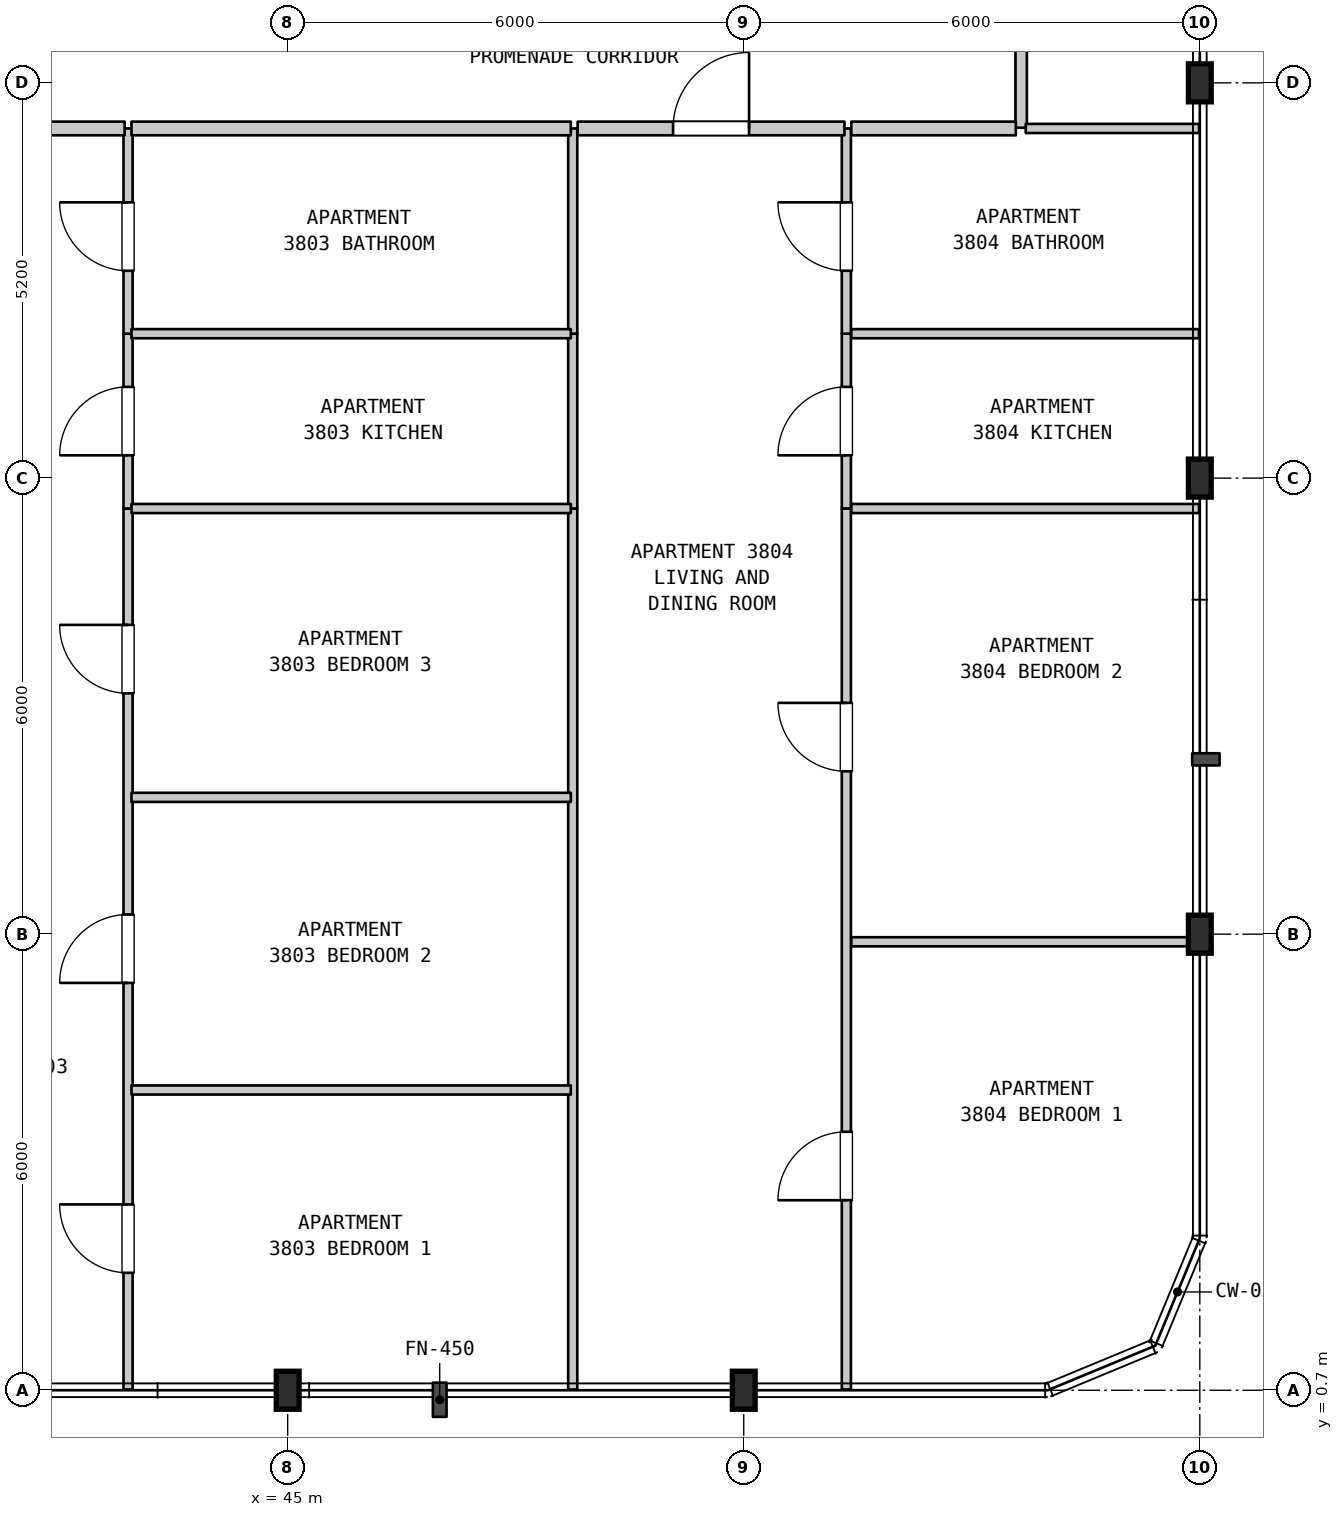
"""IFC4 building model, lengths in metres.
Left out: names, types, materials, properties, quantities, classifications, styles, units other than length and angle.
Written with IfcOpenShell. Run it as: python <this file> out.ifc"""

import sys

from ifc_helpers import new_model, si_unit, direction, frame, frame_2d, origin, origin_2d, place, context, subcontext, project, spatial, rectangle, i_section, extrude, element, fill, save


model = new_model("IFC4")
c1 = context("Model", 3, precision=1e-05, world=origin(), true_north=direction((0.0, 1.0)))
c2 = subcontext(c1, "Body", "Model", "MODEL_VIEW")
j1 = project(units=[si_unit("LENGTHUNIT", "METRE"), si_unit("PLANEANGLEUNIT", "RADIAN")], contexts=[c1])
p1 = place(None, origin())
s1 = spatial("IfcSite", under=j1, at=p1, CompositionType="ELEMENT")
p2 = place(p1, origin())
s2 = spatial("IfcBuilding", under=s1, at=p2, CompositionType="ELEMENT")
p3 = place(p2, frame((0.0, 0.0, 155.7)))
s3 = spatial("IfcBuildingStorey", under=s2, at=p3, CompositionType="ELEMENT", Elevation=155.7)
for number, where, z_axis, x_axis in (
    (1, (45.0, 0.7, 0.0), (0.0, 0.0, 1.0), (1.0, 0.0, 0.0)),
    (2, (51.0, 0.7, 0.0), (0.0, 0.0, 1.0), (1.0, 0.0, 0.0)),
    (3, (57.0, 6.7, 0.0), (0.0, 0.0, 1.0), (1.0, 0.0, 0.0)),
    (4, (57.0, 12.7, 0.0), (0.0, 0.0, 1.0), (1.0, 0.0, 0.0)),
    (5, (57.0, 17.9, 0.0), (0.0, 0.0, 1.0), (1.0, 0.0, 0.0)),
):
    element("IfcColumn", number, at=place(p3, frame(where, z_axis=z_axis, x_axis=x_axis)), inside=s3, PredefinedType="COLUMN", context=c2, shape_type="SweptSolid", body=[
        extrude(i_section(OverallWidth=0.3, OverallDepth=0.5, WebThickness=0.014, FlangeThickness=0.028, FilletRadius=0.027, at=origin_2d()), origin(), (0.0, 0.0, 1.0), 3.7),
    ])
p4 = place(p3, frame((42.9, 0.71, 0.0), z_axis=(0.0, 0.0, 1.0), x_axis=(0.0, 1.0, 0.0)))
e6 = element("IfcWall", 6, at=p4, inside=s3, PredefinedType="PARTITIONING", context=c2, shape_type="SweptSolid", body=[
    extrude(rectangle(XDim=11.59, YDim=0.12, at=frame_2d((5.795, 0.0))), origin(), (0.0, 0.0, 1.0), 3.28),
])
p5 = place(p4, frame((1.535, 0.0, 0.0)))
e7 = element("IfcOpeningElement", 7, at=p5, cuts=e6, PredefinedType="OPENING", context=c2, shape_type="SweptSolid", body=[
    extrude(rectangle(XDim=0.9, YDim=2.15, at=frame_2d((0.45, 1.075))), frame((0.0, 0.07, 0.0), z_axis=(0.0, -1.0, 0.0), x_axis=(1.0, 0.0, 0.0)), (0.0, 0.0, 1.0), 0.14),
])
p6 = place(p4, frame((5.349, 0.0, 0.0)))
e8 = element("IfcOpeningElement", 8, at=p6, cuts=e6, PredefinedType="OPENING", context=c2, shape_type="SweptSolid", body=[
    extrude(rectangle(XDim=0.9, YDim=2.15, at=frame_2d((0.45, 1.075))), frame((0.0, 0.07, 0.0), z_axis=(0.0, -1.0, 0.0), x_axis=(1.0, 0.0, 0.0)), (0.0, 0.0, 1.0), 0.14),
])
p7 = place(p4, frame((9.159, 0.0, 0.0)))
e9 = element("IfcOpeningElement", 9, at=p7, cuts=e6, PredefinedType="OPENING", context=c2, shape_type="SweptSolid", body=[
    extrude(rectangle(XDim=0.9, YDim=2.15, at=frame_2d((0.45, 1.075))), frame((0.0, 0.07, 0.0), z_axis=(0.0, -1.0, 0.0), x_axis=(1.0, 0.0, 0.0)), (0.0, 0.0, 1.0), 0.14),
])
p8 = place(p3, frame((42.9, 12.3, 0.0), z_axis=(0.0, 0.0, 1.0), x_axis=(0.0, 1.0, 0.0)))
e10 = element("IfcWall", 10, at=p8, inside=s3, PredefinedType="PARTITIONING", context=c2, shape_type="SweptSolid", body=[
    extrude(rectangle(XDim=2.3, YDim=0.12, at=frame_2d((1.15, 0.0))), origin(), (0.0, 0.0, 1.0), 3.28),
])
p9 = place(p8, frame((0.7, 0.0, 0.0)))
e11 = element("IfcOpeningElement", 11, at=p9, cuts=e10, PredefinedType="OPENING", context=c2, shape_type="SweptSolid", body=[
    extrude(rectangle(XDim=0.9, YDim=2.15, at=frame_2d((0.45, 1.075))), frame((0.0, 0.07, 0.0), z_axis=(0.0, -1.0, 0.0), x_axis=(1.0, 0.0, 0.0)), (0.0, 0.0, 1.0), 0.14),
])
p10 = place(p3, frame((42.9, 14.6, 0.0), z_axis=(0.0, 0.0, 1.0), x_axis=(0.0, 1.0, 0.0)))
e12 = element("IfcWall", 12, at=p10, inside=s3, PredefinedType="PARTITIONING", context=c2, shape_type="SweptSolid", body=[
    extrude(rectangle(XDim=2.7, YDim=0.12, at=frame_2d((1.35, 0.0))), origin(), (0.0, 0.0, 1.0), 3.28),
])
p11 = place(p10, frame((0.828, 0.0, 0.0)))
e13 = element("IfcOpeningElement", 13, at=p11, cuts=e12, PredefinedType="OPENING", context=c2, shape_type="SweptSolid", body=[
    extrude(rectangle(XDim=0.9, YDim=2.1, at=frame_2d((0.45, 1.05))), frame((0.0, 0.07, 0.0), z_axis=(0.0, -1.0, 0.0), x_axis=(1.0, 0.0, 0.0)), (0.0, 0.0, 1.0), 0.14),
])
p12 = place(p3, frame((48.75, 0.71, 0.0), z_axis=(0.0, 0.0, 1.0), x_axis=(0.0, 1.0, 0.0)))
e14 = element("IfcWall", 14, at=p12, inside=s3, PredefinedType="PARTITIONING", context=c2, shape_type="SweptSolid", body=[
    extrude(rectangle(XDim=11.59, YDim=0.12, at=frame_2d((5.795, 0.0))), origin(), (0.0, 0.0, 1.0), 3.28),
])
p13 = place(p3, frame((48.75, 12.3, 0.0), z_axis=(0.0, 0.0, 1.0), x_axis=(0.0, 1.0, 0.0)))
e15 = element("IfcWall", 15, at=p13, inside=s3, PredefinedType="PARTITIONING", context=c2, shape_type="SweptSolid", body=[
    extrude(rectangle(XDim=2.3, YDim=0.12, at=frame_2d((1.15, 0.0))), origin(), (0.0, 0.0, 1.0), 3.28),
])
p14 = place(p3, frame((48.75, 14.6, 0.0), z_axis=(0.0, 0.0, 1.0), x_axis=(0.0, 1.0, 0.0)))
e16 = element("IfcWall", 16, at=p14, inside=s3, PredefinedType="PARTITIONING", context=c2, shape_type="SweptSolid", body=[
    extrude(rectangle(XDim=2.7, YDim=0.12, at=frame_2d((1.35, 0.0))), origin(), (0.0, 0.0, 1.0), 3.28),
])
p15 = place(p3, frame((52.35, 0.71, 0.0), z_axis=(0.0, 0.0, 1.0), x_axis=(0.0, 1.0, 0.0)))
e17 = element("IfcWall", 17, at=p15, inside=s3, PredefinedType="PARTITIONING", context=c2, shape_type="SweptSolid", body=[
    extrude(rectangle(XDim=11.59, YDim=0.12, at=frame_2d((5.795, 0.0))), origin(), (0.0, 0.0, 1.0), 3.28),
])
p16 = place(p15, frame((2.49, 0.0, 0.0)))
e18 = element("IfcOpeningElement", 18, at=p16, cuts=e17, PredefinedType="OPENING", context=c2, shape_type="SweptSolid", body=[
    extrude(rectangle(XDim=0.9, YDim=2.15, at=frame_2d((0.45, 1.075))), frame((0.0, 0.07, 0.0), z_axis=(0.0, -1.0, 0.0), x_axis=(1.0, 0.0, 0.0)), (0.0, 0.0, 1.0), 0.14),
])
p17 = place(p15, frame((8.133, 0.0, 0.0)))
e19 = element("IfcOpeningElement", 19, at=p17, cuts=e17, PredefinedType="OPENING", context=c2, shape_type="SweptSolid", body=[
    extrude(rectangle(XDim=0.9, YDim=2.15, at=frame_2d((0.45, 1.075))), frame((0.0, 0.07, 0.0), z_axis=(0.0, -1.0, 0.0), x_axis=(1.0, 0.0, 0.0)), (0.0, 0.0, 1.0), 0.14),
])
p18 = place(p3, frame((52.35, 12.3, 0.0), z_axis=(0.0, 0.0, 1.0), x_axis=(0.0, 1.0, 0.0)))
e20 = element("IfcWall", 20, at=p18, inside=s3, PredefinedType="PARTITIONING", context=c2, shape_type="SweptSolid", body=[
    extrude(rectangle(XDim=2.3, YDim=0.12, at=frame_2d((1.15, 0.0))), origin(), (0.0, 0.0, 1.0), 3.28),
])
p19 = place(p18, frame((0.7, 0.0, 0.0)))
e21 = element("IfcOpeningElement", 21, at=p19, cuts=e20, PredefinedType="OPENING", context=c2, shape_type="SweptSolid", body=[
    extrude(rectangle(XDim=0.9, YDim=2.15, at=frame_2d((0.45, 1.075))), frame((0.0, 0.07, 0.0), z_axis=(0.0, -1.0, 0.0), x_axis=(1.0, 0.0, 0.0)), (0.0, 0.0, 1.0), 0.14),
])
p20 = place(p3, frame((52.35, 14.6, 0.0), z_axis=(0.0, 0.0, 1.0), x_axis=(0.0, 1.0, 0.0)))
e22 = element("IfcWall", 22, at=p20, inside=s3, PredefinedType="PARTITIONING", context=c2, shape_type="SweptSolid", body=[
    extrude(rectangle(XDim=2.7, YDim=0.12, at=frame_2d((1.35, 0.0))), origin(), (0.0, 0.0, 1.0), 3.28),
])
p21 = place(p20, frame((0.828, 0.0, 0.0)))
e23 = element("IfcOpeningElement", 23, at=p21, cuts=e22, PredefinedType="OPENING", context=c2, shape_type="SweptSolid", body=[
    extrude(rectangle(XDim=0.9, YDim=2.1, at=frame_2d((0.45, 1.05))), frame((0.0, 0.07, 0.0), z_axis=(0.0, -1.0, 0.0), x_axis=(1.0, 0.0, 0.0)), (0.0, 0.0, 1.0), 0.14),
])
p22 = place(p3, frame((54.65, 17.31, 0.0), z_axis=(0.0, 0.0, 1.0), x_axis=(0.0, 1.0, 0.0)))
e24 = element("IfcWall", 24, at=p22, inside=s3, PredefinedType="STANDARD", context=c2, shape_type="SweptSolid", body=[
    extrude(rectangle(XDim=2.19, YDim=0.15, at=frame_2d((1.095, 0.0))), origin(), (0.0, 0.0, 1.0), 3.28),
])
p23 = place(p3, frame((42.945, 4.65, 0.0), z_axis=(0.0, 0.0, 1.0), x_axis=(1.0, 0.0, 0.0)))
e25 = element("IfcWall", 25, at=p23, inside=s3, PredefinedType="PARTITIONING", context=c2, shape_type="SweptSolid", body=[
    extrude(rectangle(XDim=5.78, YDim=0.12, at=frame_2d((2.89, 0.0))), origin(), (0.0, 0.0, 1.0), 3.28),
])
p24 = place(p3, frame((52.415, 6.6, 0.0), z_axis=(0.0, 0.0, 1.0), x_axis=(1.0, 0.0, 0.0)))
e26 = element("IfcWall", 26, at=p24, inside=s3, PredefinedType="PARTITIONING", context=c2, shape_type="SweptSolid", body=[
    extrude(rectangle(XDim=4.575, YDim=0.12, at=frame_2d((2.288, 0.0))), origin(), (0.0, 0.0, 1.0), 2.68),
])
for number, where, z_axis, x_axis in (
    (27, (42.945, 8.5, 0.0), (0.0, 0.0, 1.0), (1.0, 0.0, 0.0)),
    (28, (42.945, 12.3, 0.0), (0.0, 0.0, 1.0), (1.0, 0.0, 0.0)),
):
    element("IfcWall", number, at=place(p3, frame(where, z_axis=z_axis, x_axis=x_axis)), inside=s3, PredefinedType="PARTITIONING", context=c2, shape_type="SweptSolid", body=[
        extrude(rectangle(XDim=5.78, YDim=0.12, at=frame_2d((2.89, 0.0))), origin(), (0.0, 0.0, 1.0), 3.28),
    ])
p25 = place(p3, frame((52.415, 12.3, 0.0), z_axis=(0.0, 0.0, 1.0), x_axis=(1.0, 0.0, 0.0)))
e29 = element("IfcWall", 29, at=p25, inside=s3, PredefinedType="PARTITIONING", context=c2, shape_type="SweptSolid", body=[
    extrude(rectangle(XDim=4.575, YDim=0.12, at=frame_2d((2.288, 0.0))), origin(), (0.0, 0.0, 1.0), 3.28),
])
p26 = place(p3, frame((42.945, 14.6, 0.0), z_axis=(0.0, 0.0, 1.0), x_axis=(1.0, 0.0, 0.0)))
e30 = element("IfcWall", 30, at=p26, inside=s3, PredefinedType="PARTITIONING", context=c2, shape_type="SweptSolid", body=[
    extrude(rectangle(XDim=5.78, YDim=0.12, at=frame_2d((2.89, 0.0))), origin(), (0.0, 0.0, 1.0), 3.28),
])
p27 = place(p3, frame((52.415, 14.6, 0.0), z_axis=(0.0, 0.0, 1.0), x_axis=(1.0, 0.0, 0.0)))
e31 = element("IfcWall", 31, at=p27, inside=s3, PredefinedType="PARTITIONING", context=c2, shape_type="SweptSolid", body=[
    extrude(rectangle(XDim=4.575, YDim=0.12, at=frame_2d((2.288, 0.0))), origin(), (0.0, 0.0, 1.0), 3.28),
])
p28 = place(p3, frame((38.895, 17.3, 0.0), z_axis=(0.0, 0.0, 1.0), x_axis=(1.0, 0.0, 0.0)))
e32 = element("IfcWall", 32, at=p28, inside=s3, PredefinedType="STANDARD", context=c2, shape_type="SweptSolid", body=[
    extrude(rectangle(XDim=3.96, YDim=0.18, at=frame_2d((1.98, 0.0))), origin(), (0.0, 0.0, 1.0), 3.28),
])
p29 = place(p28, frame((1.609, 0.0, 0.0)))
e33 = element("IfcOpeningElement", 33, at=p29, cuts=e32, PredefinedType="OPENING", context=c2, shape_type="SweptSolid", body=[
    extrude(rectangle(XDim=1.0, YDim=2.15, at=frame_2d((0.5, 1.075))), frame((0.0, 0.1, 0.0), z_axis=(0.0, -1.0, 0.0), x_axis=(1.0, 0.0, 0.0)), (0.0, 0.0, 1.0), 0.2),
])
p30 = place(p3, frame((42.945, 17.3, 0.0), z_axis=(0.0, 0.0, 1.0), x_axis=(1.0, 0.0, 0.0)))
e34 = element("IfcWall", 34, at=p30, inside=s3, PredefinedType="STANDARD", context=c2, shape_type="SweptSolid", body=[
    extrude(rectangle(XDim=5.78, YDim=0.18, at=frame_2d((2.89, 0.0))), origin(), (0.0, 0.0, 1.0), 3.28),
])
p31 = place(p3, frame((48.815, 17.3, 0.0), z_axis=(0.0, 0.0, 1.0), x_axis=(1.0, 0.0, 0.0)))
e35 = element("IfcWall", 35, at=p31, inside=s3, PredefinedType="STANDARD", context=c2, shape_type="SweptSolid", body=[
    extrude(rectangle(XDim=3.51, YDim=0.18, at=frame_2d((1.755, 0.0))), origin(), (0.0, 0.0, 1.0), 3.28),
])
p32 = place(p31, frame((1.255, 0.0, 0.0)))
e36 = element("IfcOpeningElement", 36, at=p32, cuts=e35, PredefinedType="OPENING", context=c2, shape_type="SweptSolid", body=[
    extrude(rectangle(XDim=1.0, YDim=2.15, at=frame_2d((0.5, 1.075))), frame((0.0, 0.1, 0.0), z_axis=(0.0, -1.0, 0.0), x_axis=(1.0, 0.0, 0.0)), (0.0, 0.0, 1.0), 0.2),
])
p33 = place(p3, frame((52.415, 17.3, 0.0), z_axis=(0.0, 0.0, 1.0), x_axis=(1.0, 0.0, 0.0)))
e37 = element("IfcWall", 37, at=p33, inside=s3, PredefinedType="STANDARD", context=c2, shape_type="SweptSolid", body=[
    extrude(rectangle(XDim=2.165, YDim=0.18, at=frame_2d((1.083, 0.0))), origin(), (0.0, 0.0, 1.0), 3.28),
])
p34 = place(p3, frame((54.71, 17.3, 0.0), z_axis=(0.0, 0.0, 1.0), x_axis=(1.0, 0.0, 0.0)))
e38 = element("IfcWall", 38, at=p34, inside=s3, PredefinedType="PARTITIONING", context=c2, shape_type="SweptSolid", body=[
    extrude(rectangle(XDim=2.28, YDim=0.12, at=frame_2d((1.14, 0.0))), origin(), (0.0, 0.0, 1.0), 3.28),
])
p35 = place(p5, origin())
e39 = element("IfcDoor", 39, at=p35, inside=s3, OperationType="SINGLE_SWING_RIGHT", PredefinedType="DOOR", context=c2, shape_type="SweptSolid", body=[
    extrude(rectangle(XDim=0.9, YDim=2.15, at=frame_2d((0.45, 1.075))), frame((0.0, 0.025, 0.0), z_axis=(0.0, -1.0, 0.0), x_axis=(1.0, 0.0, 0.0)), (0.0, 0.0, 1.0), 0.05),
])
fill(e7, e39)
p36 = place(p6, origin())
e40 = element("IfcDoor", 40, at=p36, inside=s3, OperationType="SINGLE_SWING_LEFT", PredefinedType="DOOR", context=c2, shape_type="SweptSolid", body=[
    extrude(rectangle(XDim=0.9, YDim=2.15, at=frame_2d((0.45, 1.075))), frame((0.0, 0.025, 0.0), z_axis=(0.0, -1.0, 0.0), x_axis=(1.0, 0.0, 0.0)), (0.0, 0.0, 1.0), 0.05),
])
fill(e8, e40)
p37 = place(p7, origin())
e41 = element("IfcDoor", 41, at=p37, inside=s3, OperationType="SINGLE_SWING_RIGHT", PredefinedType="DOOR", context=c2, shape_type="SweptSolid", body=[
    extrude(rectangle(XDim=0.9, YDim=2.15, at=frame_2d((0.45, 1.075))), frame((0.0, 0.025, 0.0), z_axis=(0.0, -1.0, 0.0), x_axis=(1.0, 0.0, 0.0)), (0.0, 0.0, 1.0), 0.05),
])
fill(e9, e41)
p38 = place(p9, origin())
e42 = element("IfcDoor", 42, at=p38, inside=s3, OperationType="SINGLE_SWING_LEFT", PredefinedType="DOOR", context=c2, shape_type="SweptSolid", body=[
    extrude(rectangle(XDim=0.9, YDim=2.15, at=frame_2d((0.45, 1.075))), frame((0.0, 0.025, 0.0), z_axis=(0.0, -1.0, 0.0), x_axis=(1.0, 0.0, 0.0)), (0.0, 0.0, 1.0), 0.05),
])
fill(e11, e42)
p39 = place(p11, origin())
e43 = element("IfcDoor", 43, at=p39, inside=s3, OperationType="SINGLE_SWING_RIGHT", PredefinedType="DOOR", context=c2, shape_type="SweptSolid", body=[
    extrude(rectangle(XDim=0.9, YDim=2.1, at=frame_2d((0.45, 1.05))), frame((0.0, 0.025, 0.0), z_axis=(0.0, -1.0, 0.0), x_axis=(1.0, 0.0, 0.0)), (0.0, 0.0, 1.0), 0.05),
])
fill(e13, e43)
p40 = place(p16, origin())
e44 = element("IfcDoor", 44, at=p40, inside=s3, OperationType="SINGLE_SWING_LEFT", PredefinedType="DOOR", context=c2, shape_type="SweptSolid", body=[
    extrude(rectangle(XDim=0.9, YDim=2.15, at=frame_2d((0.45, 1.075))), frame((0.0, 0.025, 0.0), z_axis=(0.0, -1.0, 0.0), x_axis=(1.0, 0.0, 0.0)), (0.0, 0.0, 1.0), 0.05),
])
fill(e18, e44)
p41 = place(p17, origin())
e45 = element("IfcDoor", 45, at=p41, inside=s3, OperationType="SINGLE_SWING_RIGHT", PredefinedType="DOOR", context=c2, shape_type="SweptSolid", body=[
    extrude(rectangle(XDim=0.9, YDim=2.15, at=frame_2d((0.45, 1.075))), frame((0.0, 0.025, 0.0), z_axis=(0.0, -1.0, 0.0), x_axis=(1.0, 0.0, 0.0)), (0.0, 0.0, 1.0), 0.05),
])
fill(e19, e45)
p42 = place(p19, origin())
e46 = element("IfcDoor", 46, at=p42, inside=s3, OperationType="SINGLE_SWING_LEFT", PredefinedType="DOOR", context=c2, shape_type="SweptSolid", body=[
    extrude(rectangle(XDim=0.9, YDim=2.15, at=frame_2d((0.45, 1.075))), frame((0.0, 0.025, 0.0), z_axis=(0.0, -1.0, 0.0), x_axis=(1.0, 0.0, 0.0)), (0.0, 0.0, 1.0), 0.05),
])
fill(e21, e46)
p43 = place(p21, origin())
e47 = element("IfcDoor", 47, at=p43, inside=s3, OperationType="SINGLE_SWING_RIGHT", PredefinedType="DOOR", context=c2, shape_type="SweptSolid", body=[
    extrude(rectangle(XDim=0.9, YDim=2.1, at=frame_2d((0.45, 1.05))), frame((0.0, 0.025, 0.0), z_axis=(0.0, -1.0, 0.0), x_axis=(1.0, 0.0, 0.0)), (0.0, 0.0, 1.0), 0.05),
])
fill(e23, e47)
p44 = place(p32, origin())
e48 = element("IfcDoor", 48, at=p44, inside=s3, OperationType="SINGLE_SWING_RIGHT", PredefinedType="DOOR", context=c2, shape_type="SweptSolid", body=[
    extrude(rectangle(XDim=1.0, YDim=2.15, at=frame_2d((0.5, 1.075))), frame((0.0, 0.025, 0.0), z_axis=(0.0, -1.0, 0.0), x_axis=(1.0, 0.0, 0.0)), (0.0, 0.0, 1.0), 0.05),
])
fill(e36, e48)
save(model, sys.argv[1])
